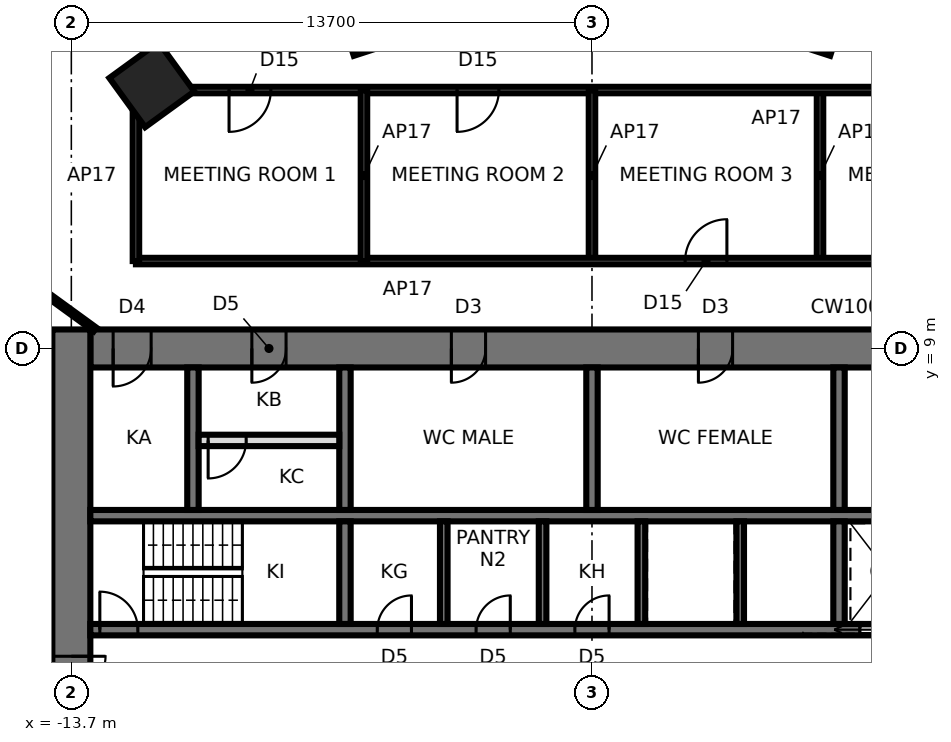
"""IFC4 building model, lengths in metres.
Left out: names, types, materials, properties, quantities, classifications, styles, units other than length and angle.
Written with IfcOpenShell. Run it as: python <this file> out.ifc"""

import sys

from ifc_helpers import new_model, si_unit, direction, frame, frame_2d, origin, origin_2d, place, context, subcontext, project, spatial, rectangle, extrude, element, fill, save


model = new_model("IFC4")
c1 = context("Model", 3, precision=1e-05, world=origin(), true_north=direction((0.0, 1.0)))
c2 = subcontext(c1, "Body", "Model", "MODEL_VIEW")
j1 = project(units=[si_unit("LENGTHUNIT", "METRE"), si_unit("PLANEANGLEUNIT", "RADIAN")], contexts=[c1])
p1 = place(None, origin())
s1 = spatial("IfcSite", under=j1, at=p1, CompositionType="ELEMENT")
p2 = place(p1, origin())
s2 = spatial("IfcBuilding", under=s1, at=p2, CompositionType="ELEMENT")
p3 = place(p2, frame((0.0, 0.0, 154.8)))
s3 = spatial("IfcBuildingStorey", under=s2, at=p3, CompositionType="ELEMENT", Elevation=154.8)
for number, where, z_axis, x_axis in (
    (1, (5.754, 17.708, 0.0), (0.0, 0.0, 1.0), (0.309, 0.951, 0.0)),
    (2, (-5.754, 17.708, 0.0), (0.0, 0.0, 1.0), (-0.309, 0.951, 0.0)),
    (3, (-11.581, 15.94, 0.0), (0.0, 0.0, 1.0), (-0.588, 0.809, 0.0)),
):
    element("IfcColumn", number, at=place(p3, frame(where, z_axis=z_axis, x_axis=x_axis)), inside=s3, PredefinedType="COLUMN", context=c2, shape_type="SweptSolid", body=[
        extrude(rectangle(XDim=1.6, YDim=1.6, at=origin_2d()), origin(), (0.0, 0.0, 1.0), 3.9),
    ])
p4 = place(p3, frame((13.2, 9.0, 0.0), z_axis=(0.0, 0.0, 1.0), x_axis=(-1.0, 0.0, 0.0)))
e4 = element("IfcWall", 4, at=p4, inside=s3, PredefinedType="SHEAR", context=c2, shape_type="SweptSolid", body=[
    extrude(rectangle(XDim=26.4, YDim=1.0, at=frame_2d((13.2, 0.0))), origin(), (0.0, 0.0, 1.0), 3.9),
])
p5 = place(p4, frame((2.65, 0.0, 0.0)))
e5 = element("IfcOpeningElement", 5, at=p5, cuts=e4, PredefinedType="OPENING", context=c2, shape_type="SweptSolid", body=[
    extrude(rectangle(XDim=0.9, YDim=2.1, at=frame_2d((0.45, 1.05))), frame((0.0, 0.51, 0.0), z_axis=(0.0, -1.0, 0.0), x_axis=(1.0, 0.0, 0.0)), (0.0, 0.0, 1.0), 1.02),
])
p6 = place(p4, frame((9.5, 0.0, 0.0)))
e6 = element("IfcOpeningElement", 6, at=p6, cuts=e4, PredefinedType="OPENING", context=c2, shape_type="SweptSolid", body=[
    extrude(rectangle(XDim=0.9, YDim=2.1, at=frame_2d((0.45, 1.05))), frame((0.0, 0.51, 0.0), z_axis=(0.0, -1.0, 0.0), x_axis=(1.0, 0.0, 0.0)), (0.0, 0.0, 1.0), 1.02),
])
p7 = place(p4, frame((16.0, 0.0, 0.0)))
e7 = element("IfcOpeningElement", 7, at=p7, cuts=e4, PredefinedType="OPENING", context=c2, shape_type="SweptSolid", body=[
    extrude(rectangle(XDim=0.9, YDim=2.1, at=frame_2d((0.45, 1.05))), frame((0.0, 0.51, 0.0), z_axis=(0.0, -1.0, 0.0), x_axis=(1.0, 0.0, 0.0)), (0.0, 0.0, 1.0), 1.02),
])
p8 = place(p4, frame((21.25, 0.0, 0.0)))
e8 = element("IfcOpeningElement", 8, at=p8, cuts=e4, PredefinedType="OPENING", context=c2, shape_type="SweptSolid", body=[
    extrude(rectangle(XDim=0.9, YDim=2.1, at=frame_2d((0.45, 1.05))), frame((0.0, 0.51, 0.0), z_axis=(0.0, -1.0, 0.0), x_axis=(1.0, 0.0, 0.0)), (0.0, 0.0, 1.0), 1.02),
])
p9 = place(p4, frame((24.8, 0.0, 0.0)))
e9 = element("IfcOpeningElement", 9, at=p9, cuts=e4, PredefinedType="OPENING", context=c2, shape_type="SweptSolid", body=[
    extrude(rectangle(XDim=1.0, YDim=2.1, at=frame_2d((0.5, 1.05))), frame((0.0, 0.51, 0.0), z_axis=(0.0, -1.0, 0.0), x_axis=(1.0, 0.0, 0.0)), (0.0, 0.0, 1.0), 1.02),
])
p10 = place(p3, frame((-13.7, 9.5, 0.0), z_axis=(0.0, 0.0, 1.0), x_axis=(0.0, -1.0, 0.0)))
e10 = element("IfcWall", 10, at=p10, inside=s3, PredefinedType="SHEAR", context=c2, shape_type="SweptSolid", body=[
    extrude(rectangle(XDim=19.0, YDim=1.0, at=frame_2d((9.5, 0.0))), origin(), (0.0, 0.0, 1.0), 3.9),
])
p11 = place(p10, frame((8.6, 0.0, 0.0)))
e11 = element("IfcOpeningElement", 11, at=p11, cuts=e10, PredefinedType="OPENING", context=c2, shape_type="SweptSolid", body=[
    extrude(rectangle(XDim=1.8, YDim=2.4, at=frame_2d((0.9, 1.2))), frame((0.0, 0.51, 0.0), z_axis=(0.0, -1.0, 0.0), x_axis=(1.0, 0.0, 0.0)), (0.0, 0.0, 1.0), 1.02),
])
p12 = place(p3, frame((-13.2, 1.6, 0.0), z_axis=(0.0, 0.0, 1.0), x_axis=(1.0, 0.0, 0.0)))
e12 = element("IfcWall", 12, at=p12, inside=s3, PredefinedType="SHEAR", context=c2, shape_type="SweptSolid", body=[
    extrude(rectangle(XDim=26.4, YDim=0.3, at=frame_2d((13.2, 0.0))), origin(), (0.0, 0.0, 1.0), 3.9),
])
p13 = place(p12, frame((0.25, 0.0, 0.0)))
e13 = element("IfcOpeningElement", 13, at=p13, cuts=e12, PredefinedType="OPENING", context=c2, shape_type="SweptSolid", body=[
    extrude(rectangle(XDim=1.0, YDim=2.1, at=frame_2d((0.5, 1.05))), frame((0.0, 0.16, 0.0), z_axis=(0.0, -1.0, 0.0), x_axis=(1.0, 0.0, 0.0)), (0.0, 0.0, 1.0), 0.32),
])
p14 = place(p12, frame((20.25, 0.0, 0.0)))
e14 = element("IfcOpeningElement", 14, at=p14, cuts=e12, PredefinedType="OPENING", context=c2, shape_type="SweptSolid", body=[
    extrude(rectangle(XDim=1.5, YDim=2.4, at=frame_2d((0.75, 1.2))), frame((0.0, 0.16, 0.0), z_axis=(0.0, -1.0, 0.0), x_axis=(1.0, 0.0, 0.0)), (0.0, 0.0, 1.0), 0.32),
])
p15 = place(p12, frame((7.55, 0.0, 0.0)))
e15 = element("IfcOpeningElement", 15, at=p15, cuts=e12, PredefinedType="OPENING", context=c2, shape_type="SweptSolid", body=[
    extrude(rectangle(XDim=0.9, YDim=2.1, at=frame_2d((0.45, 1.05))), frame((0.0, 0.16, 0.0), z_axis=(0.0, -1.0, 0.0), x_axis=(1.0, 0.0, 0.0)), (0.0, 0.0, 1.0), 0.32),
])
p16 = place(p12, frame((10.15, 0.0, 0.0)))
e16 = element("IfcOpeningElement", 16, at=p16, cuts=e12, PredefinedType="OPENING", context=c2, shape_type="SweptSolid", body=[
    extrude(rectangle(XDim=0.9, YDim=2.1, at=frame_2d((0.45, 1.05))), frame((0.0, 0.16, 0.0), z_axis=(0.0, -1.0, 0.0), x_axis=(1.0, 0.0, 0.0)), (0.0, 0.0, 1.0), 0.32),
])
p17 = place(p12, frame((12.75, 0.0, 0.0)))
e17 = element("IfcOpeningElement", 17, at=p17, cuts=e12, PredefinedType="OPENING", context=c2, shape_type="SweptSolid", body=[
    extrude(rectangle(XDim=0.9, YDim=2.1, at=frame_2d((0.45, 1.05))), frame((0.0, 0.16, 0.0), z_axis=(0.0, -1.0, 0.0), x_axis=(1.0, 0.0, 0.0)), (0.0, 0.0, 1.0), 0.32),
])
p18 = place(p12, frame((24.15, 0.0, 0.0)))
e18 = element("IfcOpeningElement", 18, at=p18, cuts=e12, PredefinedType="OPENING", context=c2, shape_type="SweptSolid", body=[
    extrude(rectangle(XDim=0.9, YDim=2.1, at=frame_2d((0.45, 1.05))), frame((0.0, 0.16, 0.0), z_axis=(0.0, -1.0, 0.0), x_axis=(1.0, 0.0, 0.0)), (0.0, 0.0, 1.0), 0.32),
])
p19 = place(p3, frame((-13.2, 4.6, 0.0), z_axis=(0.0, 0.0, 1.0), x_axis=(1.0, 0.0, 0.0)))
e19 = element("IfcWall", 19, at=p19, inside=s3, PredefinedType="SHEAR", context=c2, shape_type="SweptSolid", body=[
    extrude(rectangle(XDim=26.4, YDim=0.3, at=frame_2d((13.2, 0.0))), origin(), (0.0, 0.0, 1.0), 3.9),
])
p20 = place(p3, frame((-6.5, 1.75, 0.0), z_axis=(0.0, 0.0, 1.0), x_axis=(0.0, 1.0, 0.0)))
e20 = element("IfcWall", 20, at=p20, inside=s3, PredefinedType="SHEAR", context=c2, shape_type="SweptSolid", body=[
    extrude(rectangle(XDim=2.7, YDim=0.3, at=frame_2d((1.35, 0.0))), origin(), (0.0, 0.0, 1.0), 3.9),
])
p21 = place(p3, frame((-6.5, 4.75, 0.0), z_axis=(0.0, 0.0, 1.0), x_axis=(0.0, 1.0, 0.0)))
e21 = element("IfcWall", 21, at=p21, inside=s3, PredefinedType="SHEAR", context=c2, shape_type="SweptSolid", body=[
    extrude(rectangle(XDim=3.75, YDim=0.3, at=frame_2d((1.875, 0.0))), origin(), (0.0, 0.0, 1.0), 3.9),
])
p22 = place(p3, frame((6.5, 1.75, 0.0), z_axis=(0.0, 0.0, 1.0), x_axis=(0.0, 1.0, 0.0)))
e22 = element("IfcWall", 22, at=p22, inside=s3, PredefinedType="SHEAR", context=c2, shape_type="SweptSolid", body=[
    extrude(rectangle(XDim=2.7, YDim=0.3, at=frame_2d((1.35, 0.0))), origin(), (0.0, 0.0, 1.0), 3.9),
])
p23 = place(p3, frame((6.5, 4.75, 0.0), z_axis=(0.0, 0.0, 1.0), x_axis=(0.0, 1.0, 0.0)))
e23 = element("IfcWall", 23, at=p23, inside=s3, PredefinedType="SHEAR", context=c2, shape_type="SweptSolid", body=[
    extrude(rectangle(XDim=3.75, YDim=0.3, at=frame_2d((1.875, 0.0))), origin(), (0.0, 0.0, 1.0), 3.9),
])
for number, where, z_axis, x_axis in (
    (24, (-3.9, 1.75, 0.0), (0.0, 0.0, 1.0), (0.0, 1.0, 0.0)),
    (25, (-1.3, 1.75, 0.0), (0.0, 0.0, 1.0), (0.0, 1.0, 0.0)),
    (26, (1.3, 1.75, 0.0), (0.0, 0.0, 1.0), (0.0, 1.0, 0.0)),
    (27, (3.9, 1.75, 0.0), (0.0, 0.0, 1.0), (0.0, 1.0, 0.0)),
):
    element("IfcWall", number, at=place(p3, frame(where, z_axis=z_axis, x_axis=x_axis)), inside=s3, PredefinedType="SHEAR", context=c2, shape_type="SweptSolid", body=[
        extrude(rectangle(XDim=2.7, YDim=0.2, at=frame_2d((1.35, 0.0))), origin(), (0.0, 0.0, 1.0), 3.9),
    ])
for number, where, z_axis, x_axis in (
    (28, (0.0, 4.75, 0.0), (0.0, 0.0, 1.0), (0.0, 1.0, 0.0)),
    (29, (-10.5, 4.75, 0.0), (0.0, 0.0, 1.0), (0.0, 1.0, 0.0)),
):
    element("IfcWall", number, at=place(p3, frame(where, z_axis=z_axis, x_axis=x_axis)), inside=s3, PredefinedType="SHEAR", context=c2, shape_type="SweptSolid", body=[
        extrude(rectangle(XDim=3.75, YDim=0.3, at=frame_2d((1.875, 0.0))), origin(), (0.0, 0.0, 1.0), 3.9),
    ])
p24 = place(p3, frame((-10.35, 6.58, 0.0), z_axis=(0.0, 0.0, 1.0), x_axis=(1.0, 0.0, 0.0)))
e30 = element("IfcWall", 30, at=p24, inside=s3, PredefinedType="PARTITIONING", context=c2, shape_type="SweptSolid", body=[
    extrude(rectangle(XDim=3.7, YDim=0.3, at=frame_2d((1.85, 0.0))), origin(), (0.0, 0.0, 1.0), 3.74),
])
p25 = place(p24, frame((0.25, 0.0, 0.0)))
e31 = element("IfcOpeningElement", 31, at=p25, cuts=e30, PredefinedType="OPENING", context=c2, shape_type="SweptSolid", body=[
    extrude(rectangle(XDim=1.0, YDim=2.4, at=frame_2d((0.5, 1.2))), frame((0.0, 0.16, 0.0), z_axis=(0.0, -1.0, 0.0), x_axis=(1.0, 0.0, 0.0)), (0.0, 0.0, 1.0), 0.32),
])
p26 = place(p3, frame((6.0, 15.8, 0.0), z_axis=(0.0, 0.0, 1.0), x_axis=(0.0, -1.0, 0.0)))
e32 = element("IfcWall", 32, at=p26, inside=s3, PredefinedType="PARTITIONING", context=c2, shape_type="SweptSolid", body=[
    extrude(rectangle(XDim=4.5, YDim=0.17, at=frame_2d((2.25, 0.0))), origin(), (0.0, 0.0, 1.0), 3.74),
])
p27 = place(p3, frame((-12.0, 15.8, 0.0), z_axis=(0.0, 0.0, 1.0), x_axis=(1.0, 0.0, 0.0)))
e33 = element("IfcWall", 33, at=p27, inside=s3, PredefinedType="PARTITIONING", context=c2, shape_type="SweptSolid", body=[
    extrude(rectangle(XDim=24.0, YDim=0.17, at=frame_2d((12.0, 0.0))), origin(), (0.0, 0.0, 1.0), 3.74),
])
p28 = place(p27, frame((2.45, 0.0, 0.0)))
e34 = element("IfcOpeningElement", 34, at=p28, cuts=e33, PredefinedType="OPENING", context=c2, shape_type="SweptSolid", body=[
    extrude(rectangle(XDim=1.1, YDim=2.4, at=frame_2d((0.55, 1.2))), frame((0.0, 0.095, 0.0), z_axis=(0.0, -1.0, 0.0), x_axis=(1.0, 0.0, 0.0)), (0.0, 0.0, 1.0), 0.19),
])
p29 = place(p27, frame((8.45, 0.0, 0.0)))
e35 = element("IfcOpeningElement", 35, at=p29, cuts=e33, PredefinedType="OPENING", context=c2, shape_type="SweptSolid", body=[
    extrude(rectangle(XDim=1.1, YDim=2.4, at=frame_2d((0.55, 1.2))), frame((0.0, 0.095, 0.0), z_axis=(0.0, -1.0, 0.0), x_axis=(1.0, 0.0, 0.0)), (0.0, 0.0, 1.0), 0.19),
])
p30 = place(p3, frame((0.0, 15.8, 0.0), z_axis=(0.0, 0.0, 1.0), x_axis=(0.0, -1.0, 0.0)))
e36 = element("IfcWall", 36, at=p30, inside=s3, PredefinedType="PARTITIONING", context=c2, shape_type="SweptSolid", body=[
    extrude(rectangle(XDim=4.5, YDim=0.17, at=frame_2d((2.25, 0.0))), origin(), (0.0, 0.0, 1.0), 2.94),
])
p31 = place(p3, frame((12.0, 11.3, 0.0), z_axis=(0.0, 0.0, 1.0), x_axis=(-1.0, 0.0, 0.0)))
e37 = element("IfcWall", 37, at=p31, inside=s3, PredefinedType="PARTITIONING", context=c2, shape_type="SweptSolid", body=[
    extrude(rectangle(XDim=24.0, YDim=0.17, at=frame_2d((12.0, 0.0))), origin(), (0.0, 0.0, 1.0), 3.74),
])
p32 = place(p31, frame((8.45, 0.0, 0.0)))
e38 = element("IfcOpeningElement", 38, at=p32, cuts=e37, PredefinedType="OPENING", context=c2, shape_type="SweptSolid", body=[
    extrude(rectangle(XDim=1.1, YDim=2.4, at=frame_2d((0.55, 1.2))), frame((0.0, 0.095, 0.0), z_axis=(0.0, -1.0, 0.0), x_axis=(1.0, 0.0, 0.0)), (0.0, 0.0, 1.0), 0.19),
])
p33 = place(p31, frame((2.45, 0.0, 0.0)))
e39 = element("IfcOpeningElement", 39, at=p33, cuts=e37, PredefinedType="OPENING", context=c2, shape_type="SweptSolid", body=[
    extrude(rectangle(XDim=1.1, YDim=2.4, at=frame_2d((0.55, 1.2))), frame((0.0, 0.095, 0.0), z_axis=(0.0, -1.0, 0.0), x_axis=(1.0, 0.0, 0.0)), (0.0, 0.0, 1.0), 0.19),
])
for number, where, z_axis, x_axis in (
    (40, (-6.0, 15.8, 0.0), (0.0, 0.0, 1.0), (0.0, -1.0, 0.0)),
    (41, (-12.0, 11.3, 0.0), (0.0, 0.0, 1.0), (0.0, 1.0, 0.0)),
):
    element("IfcWall", number, at=place(p3, frame(where, z_axis=z_axis, x_axis=x_axis)), inside=s3, PredefinedType="PARTITIONING", context=c2, shape_type="SweptSolid", body=[
        extrude(rectangle(XDim=4.5, YDim=0.17, at=frame_2d((2.25, 0.0))), origin(), (0.0, 0.0, 1.0), 3.74),
    ])
p34 = place(p3, frame((-19.584, 14.229, 0.0), z_axis=(0.0, 0.0, 1.0), x_axis=(0.809005026648, -0.587801724103, 0.0)))
e42 = element("IfcWall", 42, at=p34, inside=s3, PredefinedType="PARTITIONING", context=c2, shape_type="SweptSolid", body=[
    extrude(rectangle(XDim=8.045, YDim=0.12, at=frame_2d((4.022, 0.0))), origin(), (0.0, 0.0, 1.0), 2.94),
])
p35 = place(p11, origin())
e43 = element("IfcDoor", 43, at=p35, inside=s3, OperationType="DOUBLE_DOOR_SINGLE_SWING", PredefinedType="DOOR", context=c2, shape_type="SweptSolid", body=[
    extrude(rectangle(XDim=1.72, YDim=2.36, at=frame_2d((0.9, 1.18))), frame((0.0, 0.025, 0.0), z_axis=(0.0, -1.0, 0.0), x_axis=(1.0, 0.0, 0.0)), (0.0, 0.0, 1.0), 0.05),
    extrude(rectangle(XDim=0.04, YDim=2.4, at=frame_2d((0.02, 1.2))), frame((0.0, 0.25, 0.0), z_axis=(0.0, -1.0, 0.0), x_axis=(1.0, 0.0, 0.0)), (0.0, 0.0, 1.0), 0.5),
    extrude(rectangle(XDim=0.04, YDim=2.4, at=frame_2d((1.78, 1.2))), frame((0.0, 0.25, 0.0), z_axis=(0.0, -1.0, 0.0), x_axis=(1.0, 0.0, 0.0)), (0.0, 0.0, 1.0), 0.5),
    extrude(rectangle(XDim=1.72, YDim=0.04, at=frame_2d((0.9, 2.38))), frame((0.0, 0.25, 0.0), z_axis=(0.0, -1.0, 0.0), x_axis=(1.0, 0.0, 0.0)), (0.0, 0.0, 1.0), 0.5),
])
fill(e11, e43)
p36 = place(p13, origin())
e44 = element("IfcDoor", 44, at=p36, inside=s3, OperationType="SINGLE_SWING_LEFT", PredefinedType="DOOR", context=c2, shape_type="SweptSolid", body=[
    extrude(rectangle(XDim=1.0, YDim=2.1, at=frame_2d((0.5, 1.05))), frame((0.0, 0.025, 0.0), z_axis=(0.0, -1.0, 0.0), x_axis=(1.0, 0.0, 0.0)), (0.0, 0.0, 1.0), 0.05),
])
fill(e13, e44)
p37 = place(p14, origin())
e45 = element("IfcDoor", 45, at=p37, inside=s3, OperationType="SLIDING_TO_LEFT", PredefinedType="DOOR", context=c2, shape_type="SweptSolid", body=[
    extrude(rectangle(XDim=1.5, YDim=2.4, at=frame_2d((0.75, 1.2))), frame((0.0, 0.025, 0.0), z_axis=(0.0, -1.0, 0.0), x_axis=(1.0, 0.0, 0.0)), (0.0, 0.0, 1.0), 0.05),
])
fill(e14, e45)
p38 = place(p15, origin())
e46 = element("IfcDoor", 46, at=p38, inside=s3, OperationType="SINGLE_SWING_RIGHT", PredefinedType="DOOR", context=c2, shape_type="SweptSolid", body=[
    extrude(rectangle(XDim=0.9, YDim=2.1, at=frame_2d((0.45, 1.05))), frame((0.0, 0.025, 0.0), z_axis=(0.0, -1.0, 0.0), x_axis=(1.0, 0.0, 0.0)), (0.0, 0.0, 1.0), 0.05),
])
fill(e15, e46)
p39 = place(p16, origin())
e47 = element("IfcDoor", 47, at=p39, inside=s3, OperationType="SINGLE_SWING_RIGHT", PredefinedType="DOOR", context=c2, shape_type="SweptSolid", body=[
    extrude(rectangle(XDim=0.9, YDim=2.1, at=frame_2d((0.45, 1.05))), frame((0.0, 0.025, 0.0), z_axis=(0.0, -1.0, 0.0), x_axis=(1.0, 0.0, 0.0)), (0.0, 0.0, 1.0), 0.05),
])
fill(e16, e47)
p40 = place(p17, origin())
e48 = element("IfcDoor", 48, at=p40, inside=s3, OperationType="SINGLE_SWING_RIGHT", PredefinedType="DOOR", context=c2, shape_type="SweptSolid", body=[
    extrude(rectangle(XDim=0.9, YDim=2.1, at=frame_2d((0.45, 1.05))), frame((0.0, 0.025, 0.0), z_axis=(0.0, -1.0, 0.0), x_axis=(1.0, 0.0, 0.0)), (0.0, 0.0, 1.0), 0.05),
])
fill(e17, e48)
p41 = place(p6, origin())
e49 = element("IfcDoor", 49, at=p41, inside=s3, OperationType="SINGLE_SWING_RIGHT", PredefinedType="DOOR", context=c2, shape_type="SweptSolid", body=[
    extrude(rectangle(XDim=0.82, YDim=2.06, at=frame_2d((0.45, 1.03))), frame((0.0, 0.025, 0.0), z_axis=(0.0, -1.0, 0.0), x_axis=(1.0, 0.0, 0.0)), (0.0, 0.0, 1.0), 0.05),
    extrude(rectangle(XDim=0.04, YDim=2.1, at=frame_2d((0.02, 1.05))), frame((0.0, 0.25, 0.0), z_axis=(0.0, -1.0, 0.0), x_axis=(1.0, 0.0, 0.0)), (0.0, 0.0, 1.0), 0.5),
    extrude(rectangle(XDim=0.04, YDim=2.1, at=frame_2d((0.88, 1.05))), frame((0.0, 0.25, 0.0), z_axis=(0.0, -1.0, 0.0), x_axis=(1.0, 0.0, 0.0)), (0.0, 0.0, 1.0), 0.5),
    extrude(rectangle(XDim=0.82, YDim=0.04, at=frame_2d((0.45, 2.08))), frame((0.0, 0.25, 0.0), z_axis=(0.0, -1.0, 0.0), x_axis=(1.0, 0.0, 0.0)), (0.0, 0.0, 1.0), 0.5),
])
fill(e6, e49)
p42 = place(p7, origin())
e50 = element("IfcDoor", 50, at=p42, inside=s3, OperationType="SINGLE_SWING_RIGHT", PredefinedType="DOOR", context=c2, shape_type="SweptSolid", body=[
    extrude(rectangle(XDim=0.82, YDim=2.06, at=frame_2d((0.45, 1.03))), frame((0.0, 0.025, 0.0), z_axis=(0.0, -1.0, 0.0), x_axis=(1.0, 0.0, 0.0)), (0.0, 0.0, 1.0), 0.05),
    extrude(rectangle(XDim=0.04, YDim=2.1, at=frame_2d((0.02, 1.05))), frame((0.0, 0.25, 0.0), z_axis=(0.0, -1.0, 0.0), x_axis=(1.0, 0.0, 0.0)), (0.0, 0.0, 1.0), 0.5),
    extrude(rectangle(XDim=0.04, YDim=2.1, at=frame_2d((0.88, 1.05))), frame((0.0, 0.25, 0.0), z_axis=(0.0, -1.0, 0.0), x_axis=(1.0, 0.0, 0.0)), (0.0, 0.0, 1.0), 0.5),
    extrude(rectangle(XDim=0.82, YDim=0.04, at=frame_2d((0.45, 2.08))), frame((0.0, 0.25, 0.0), z_axis=(0.0, -1.0, 0.0), x_axis=(1.0, 0.0, 0.0)), (0.0, 0.0, 1.0), 0.5),
])
fill(e7, e50)
p43 = place(p8, origin())
e51 = element("IfcDoor", 51, at=p43, inside=s3, OperationType="SINGLE_SWING_RIGHT", PredefinedType="DOOR", context=c2, shape_type="SweptSolid", body=[
    extrude(rectangle(XDim=0.82, YDim=2.06, at=frame_2d((0.45, 1.03))), frame((0.0, 0.025, 0.0), z_axis=(0.0, -1.0, 0.0), x_axis=(1.0, 0.0, 0.0)), (0.0, 0.0, 1.0), 0.05),
    extrude(rectangle(XDim=0.04, YDim=2.1, at=frame_2d((0.02, 1.05))), frame((0.0, 0.25, 0.0), z_axis=(0.0, -1.0, 0.0), x_axis=(1.0, 0.0, 0.0)), (0.0, 0.0, 1.0), 0.5),
    extrude(rectangle(XDim=0.04, YDim=2.1, at=frame_2d((0.88, 1.05))), frame((0.0, 0.25, 0.0), z_axis=(0.0, -1.0, 0.0), x_axis=(1.0, 0.0, 0.0)), (0.0, 0.0, 1.0), 0.5),
    extrude(rectangle(XDim=0.82, YDim=0.04, at=frame_2d((0.45, 2.08))), frame((0.0, 0.25, 0.0), z_axis=(0.0, -1.0, 0.0), x_axis=(1.0, 0.0, 0.0)), (0.0, 0.0, 1.0), 0.5),
])
fill(e8, e51)
p44 = place(p9, origin())
e52 = element("IfcDoor", 52, at=p44, inside=s3, OperationType="SINGLE_SWING_RIGHT", PredefinedType="DOOR", context=c2, shape_type="SweptSolid", body=[
    extrude(rectangle(XDim=0.92, YDim=2.06, at=frame_2d((0.5, 1.03))), frame((0.0, 0.025, 0.0), z_axis=(0.0, -1.0, 0.0), x_axis=(1.0, 0.0, 0.0)), (0.0, 0.0, 1.0), 0.05),
    extrude(rectangle(XDim=0.04, YDim=2.1, at=frame_2d((0.02, 1.05))), frame((0.0, 0.25, 0.0), z_axis=(0.0, -1.0, 0.0), x_axis=(1.0, 0.0, 0.0)), (0.0, 0.0, 1.0), 0.5),
    extrude(rectangle(XDim=0.04, YDim=2.1, at=frame_2d((0.98, 1.05))), frame((0.0, 0.25, 0.0), z_axis=(0.0, -1.0, 0.0), x_axis=(1.0, 0.0, 0.0)), (0.0, 0.0, 1.0), 0.5),
    extrude(rectangle(XDim=0.92, YDim=0.04, at=frame_2d((0.5, 2.08))), frame((0.0, 0.25, 0.0), z_axis=(0.0, -1.0, 0.0), x_axis=(1.0, 0.0, 0.0)), (0.0, 0.0, 1.0), 0.5),
])
fill(e9, e52)
p45 = place(p25, frame((1.0, 0.0, 0.0), z_axis=(0.0, 0.0, 1.0), x_axis=(-1.0, 0.0, 0.0)))
e53 = element("IfcDoor", 53, at=p45, inside=s3, OperationType="SINGLE_SWING_RIGHT", PredefinedType="DOOR", context=c2, shape_type="SweptSolid", body=[
    extrude(rectangle(XDim=1.0, YDim=2.4, at=frame_2d((0.5, 1.2))), frame((0.0, 0.025, 0.0), z_axis=(0.0, -1.0, 0.0), x_axis=(1.0, 0.0, 0.0)), (0.0, 0.0, 1.0), 0.05),
])
fill(e31, e53)
p46 = place(p28, frame((1.1, 0.0, 0.0), z_axis=(0.0, 0.0, 1.0), x_axis=(-1.0, 0.0, 0.0)))
e54 = element("IfcDoor", 54, at=p46, inside=s3, OperationType="SINGLE_SWING_RIGHT", PredefinedType="DOOR", context=c2, shape_type="SweptSolid", body=[
    extrude(rectangle(XDim=1.1, YDim=2.4, at=frame_2d((0.55, 1.2))), frame((0.0, 0.025, 0.0), z_axis=(0.0, -1.0, 0.0), x_axis=(1.0, 0.0, 0.0)), (0.0, 0.0, 1.0), 0.05),
])
fill(e34, e54)
p47 = place(p29, frame((1.1, 0.0, 0.0), z_axis=(0.0, 0.0, 1.0), x_axis=(-1.0, 0.0, 0.0)))
e55 = element("IfcDoor", 55, at=p47, inside=s3, OperationType="SINGLE_SWING_RIGHT", PredefinedType="DOOR", context=c2, shape_type="SweptSolid", body=[
    extrude(rectangle(XDim=1.1, YDim=2.4, at=frame_2d((0.55, 1.2))), frame((0.0, 0.025, 0.0), z_axis=(0.0, -1.0, 0.0), x_axis=(1.0, 0.0, 0.0)), (0.0, 0.0, 1.0), 0.05),
])
fill(e35, e55)
p48 = place(p32, frame((1.1, 0.0, 0.0), z_axis=(0.0, 0.0, 1.0), x_axis=(-1.0, 0.0, 0.0)))
e56 = element("IfcDoor", 56, at=p48, inside=s3, OperationType="SINGLE_SWING_RIGHT", PredefinedType="DOOR", context=c2, shape_type="SweptSolid", body=[
    extrude(rectangle(XDim=1.1, YDim=2.4, at=frame_2d((0.55, 1.2))), frame((0.0, 0.025, 0.0), z_axis=(0.0, -1.0, 0.0), x_axis=(1.0, 0.0, 0.0)), (0.0, 0.0, 1.0), 0.05),
])
fill(e38, e56)
save(model, sys.argv[1])
